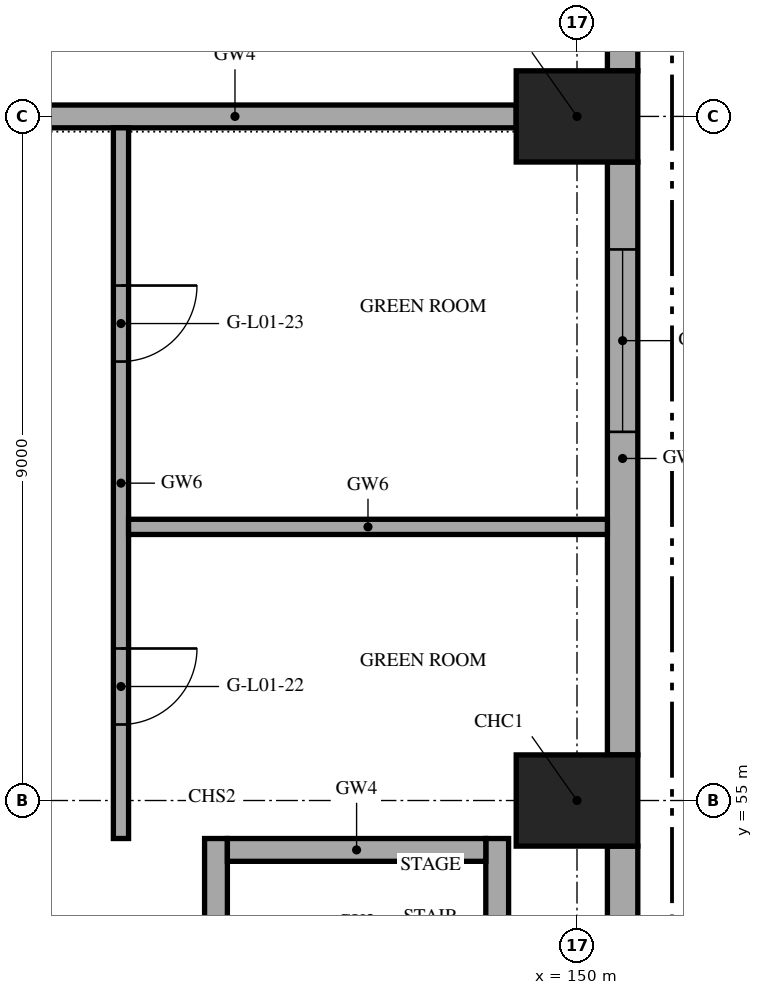
"""IFC4 building model, lengths in metres.
Left out: names, types, materials, properties, quantities, classifications, styles, units other than length and angle.
Written with IfcOpenShell. Run it as: python <this file> out.ifc"""

import sys

from ifc_helpers import new_model, si_unit, direction, frame, frame_2d, origin, origin_2d, place, context, subcontext, project, spatial, rectangle, extrude, element, fill, save


model = new_model("IFC4")
c1 = context("Model", 3, precision=1e-05, world=origin(), true_north=direction((0.0, 1.0)))
c2 = subcontext(c1, "Body", "Model", "MODEL_VIEW")
j1 = project(units=[si_unit("LENGTHUNIT", "METRE"), si_unit("PLANEANGLEUNIT", "RADIAN")], contexts=[c1])
p1 = place(None, origin())
s1 = spatial("IfcSite", under=j1, at=p1, CompositionType="ELEMENT")
p2 = place(p1, origin())
s2 = spatial("IfcBuilding", under=s1, at=p2, CompositionType="ELEMENT")
p3 = place(p2, frame((0.0, 0.0, 5.0)))
s3 = spatial("IfcBuildingStorey", under=s2, at=p3, CompositionType="ELEMENT", Elevation=5.0)
for number, where, z_axis, x_axis in (
    (1, (150.0, 55.0, 0.0), (0.0, 0.0, 1.0), (1.0, 0.0, 0.0)),
    (2, (150.0, 64.0, 0.0), (0.0, 0.0, 1.0), (1.0, 0.0, 0.0)),
):
    element("IfcColumn", number, at=place(p3, frame(where, z_axis=z_axis, x_axis=x_axis)), inside=s3, PredefinedType="COLUMN", context=c2, shape_type="SweptSolid", body=[
        extrude(rectangle(XDim=1.6, YDim=1.2, at=origin_2d()), origin(), (0.0, 0.0, 1.0), 5.0),
    ])
p4 = place(p3, frame((141.8, 64.0, 0.0), z_axis=(0.0, 0.0, 1.0), x_axis=(1.0, 0.0, 0.0)))
e3 = element("IfcWall", 3, at=p4, inside=s3, PredefinedType="SHEAR", context=c2, shape_type="SweptSolid", body=[
    extrude(rectangle(XDim=7.4, YDim=0.3, at=frame_2d((3.7, 0.0))), origin(), (0.0, 0.0, 1.0), 5.0),
])
p5 = place(p3, frame((145.25, 46.2, 0.0), z_axis=(0.0, 0.0, 1.0), x_axis=(0.0, 1.0, 0.0)))
e4 = element("IfcWall", 4, at=p5, inside=s3, PredefinedType="SHEAR", context=c2, shape_type="SweptSolid", body=[
    extrude(rectangle(XDim=8.3, YDim=0.3, at=frame_2d((4.15, 0.0))), origin(), (0.0, 0.0, 1.0), 5.0),
])
p6 = place(p5, frame((0.085, 0.0, 0.0)))
e5 = element("IfcOpeningElement", 5, at=p6, cuts=e4, PredefinedType="OPENING", context=c2, shape_type="SweptSolid", body=[
    extrude(rectangle(XDim=1.45, YDim=2.1, at=frame_2d((0.725, 1.05))), frame((0.0, 0.16, 0.0), z_axis=(0.0, -1.0, 0.0), x_axis=(1.0, 0.0, 0.0)), (0.0, 0.0, 1.0), 0.32),
])
p7 = place(p3, frame((148.95, 46.2, 0.0), z_axis=(0.0, 0.0, 1.0), x_axis=(0.0, 1.0, 0.0)))
e6 = element("IfcWall", 6, at=p7, inside=s3, PredefinedType="SHEAR", context=c2, shape_type="SweptSolid", body=[
    extrude(rectangle(XDim=8.3, YDim=0.3, at=frame_2d((4.15, 0.0))), origin(), (0.0, 0.0, 1.0), 5.0),
])
p8 = place(p3, frame((145.4, 54.35, 0.0), z_axis=(0.0, 0.0, 1.0), x_axis=(1.0, 0.0, 0.0)))
e7 = element("IfcWall", 7, at=p8, inside=s3, PredefinedType="SHEAR", context=c2, shape_type="SweptSolid", body=[
    extrude(rectangle(XDim=3.4, YDim=0.3, at=frame_2d((1.7, 0.0))), origin(), (0.0, 0.0, 1.0), 5.0),
])
p9 = place(p3, frame((150.6, 46.6, 0.0), z_axis=(0.0, 0.0, 1.0), x_axis=(0.0, 1.0, 0.0)))
e8 = element("IfcWall", 8, at=p9, inside=s3, PredefinedType="SOLIDWALL", context=c2, shape_type="SweptSolid", body=[
    extrude(rectangle(XDim=7.8, YDim=0.4, at=frame_2d((3.9, 0.0))), origin(), (0.0, 0.0, 1.0), 5.0),
])
p10 = place(p9, frame((2.7, 0.0, 1.2)))
e9 = element("IfcOpeningElement", 9, at=p10, cuts=e8, PredefinedType="OPENING", context=c2, shape_type="SweptSolid", body=[
    extrude(rectangle(XDim=2.4, YDim=1.8, at=frame_2d((1.2, 0.9))), frame((0.0, 0.21, 0.0), z_axis=(0.0, -1.0, 0.0), x_axis=(1.0, 0.0, 0.0)), (0.0, 0.0, 1.0), 0.42),
])
p11 = place(p3, frame((150.6, 55.6, 0.0), z_axis=(0.0, 0.0, 1.0), x_axis=(0.0, 1.0, 0.0)))
e10 = element("IfcWall", 10, at=p11, inside=s3, PredefinedType="SOLIDWALL", context=c2, shape_type="SweptSolid", body=[
    extrude(rectangle(XDim=7.8, YDim=0.4, at=frame_2d((3.9, 0.0))), origin(), (0.0, 0.0, 1.0), 5.0),
])
p12 = place(p11, frame((4.25, 0.0, 1.2)))
e11 = element("IfcOpeningElement", 11, at=p12, cuts=e10, PredefinedType="OPENING", context=c2, shape_type="SweptSolid", body=[
    extrude(rectangle(XDim=2.4, YDim=1.8, at=frame_2d((1.2, 0.9))), frame((0.0, 0.21, 0.0), z_axis=(0.0, -1.0, 0.0), x_axis=(1.0, 0.0, 0.0)), (0.0, 0.0, 1.0), 0.42),
])
p13 = place(p3, frame((150.6, 64.6, 0.0), z_axis=(0.0, 0.0, 1.0), x_axis=(0.0, 1.0, 0.0)))
e12 = element("IfcWall", 12, at=p13, inside=s3, PredefinedType="SOLIDWALL", context=c2, shape_type="SweptSolid", body=[
    extrude(rectangle(XDim=7.8, YDim=0.4, at=frame_2d((3.9, 0.0))), origin(), (0.0, 0.0, 1.0), 5.0),
])
p14 = place(p3, frame((144.0, 54.5, 0.0), z_axis=(0.0, 0.0, 1.0), x_axis=(0.0, 1.0, 0.0)))
e13 = element("IfcWall", 13, at=p14, inside=s3, PredefinedType="PARTITIONING", context=c2, shape_type="SweptSolid", body=[
    extrude(rectangle(XDim=9.35, YDim=0.2, at=frame_2d((4.675, 0.0))), origin(), (0.0, 0.0, 1.0), 4.7),
])
p15 = place(p14, frame((1.5, 0.0, 0.0)))
e14 = element("IfcOpeningElement", 14, at=p15, cuts=e13, PredefinedType="OPENING", context=c2, shape_type="SweptSolid", body=[
    extrude(rectangle(XDim=1.0, YDim=2.1, at=frame_2d((0.5, 1.05))), frame((0.0, 0.11, 0.0), z_axis=(0.0, -1.0, 0.0), x_axis=(1.0, 0.0, 0.0)), (0.0, 0.0, 1.0), 0.22),
])
p16 = place(p14, frame((6.275, 0.0, 0.0)))
e15 = element("IfcOpeningElement", 15, at=p16, cuts=e13, PredefinedType="OPENING", context=c2, shape_type="SweptSolid", body=[
    extrude(rectangle(XDim=1.0, YDim=2.1, at=frame_2d((0.5, 1.05))), frame((0.0, 0.11, 0.0), z_axis=(0.0, -1.0, 0.0), x_axis=(1.0, 0.0, 0.0)), (0.0, 0.0, 1.0), 0.22),
])
p17 = place(p3, frame((144.1, 58.6, 0.0), z_axis=(0.0, 0.0, 1.0), x_axis=(1.0, 0.0, 0.0)))
e16 = element("IfcWall", 16, at=p17, inside=s3, PredefinedType="PARTITIONING", context=c2, shape_type="SweptSolid", body=[
    extrude(rectangle(XDim=6.3, YDim=0.2, at=frame_2d((3.15, 0.0))), origin(), (0.0, 0.0, 1.0), 4.7),
])
p18 = place(p12, origin())
e17 = element("IfcWindow", 17, at=p18, inside=s3, PartitioningType="SINGLE_PANEL", PredefinedType="WINDOW", context=c2, shape_type="SweptSolid", body=[
    extrude(rectangle(XDim=2.4, YDim=1.8, at=frame_2d((1.2, 0.9))), frame((0.0, 0.03, 0.0), z_axis=(0.0, -1.0, 0.0), x_axis=(1.0, 0.0, 0.0)), (0.0, 0.0, 1.0), 0.06),
])
fill(e11, e17)
p19 = place(p15, frame((1.0, 0.0, 0.0), z_axis=(0.0, 0.0, 1.0), x_axis=(-1.0, 0.0, 0.0)))
e18 = element("IfcDoor", 18, at=p19, inside=s3, OperationType="SINGLE_SWING_LEFT", PredefinedType="DOOR", context=c2, shape_type="SweptSolid", body=[
    extrude(rectangle(XDim=1.0, YDim=2.1, at=frame_2d((0.5, 1.05))), frame((0.0, 0.025, 0.0), z_axis=(0.0, -1.0, 0.0), x_axis=(1.0, 0.0, 0.0)), (0.0, 0.0, 1.0), 0.05),
])
fill(e14, e18)
p20 = place(p16, frame((1.0, 0.0, 0.0), z_axis=(0.0, 0.0, 1.0), x_axis=(-1.0, 0.0, 0.0)))
e19 = element("IfcDoor", 19, at=p20, inside=s3, OperationType="SINGLE_SWING_LEFT", PredefinedType="DOOR", context=c2, shape_type="SweptSolid", body=[
    extrude(rectangle(XDim=1.0, YDim=2.1, at=frame_2d((0.5, 1.05))), frame((0.0, 0.025, 0.0), z_axis=(0.0, -1.0, 0.0), x_axis=(1.0, 0.0, 0.0)), (0.0, 0.0, 1.0), 0.05),
])
fill(e15, e19)
save(model, sys.argv[1])
